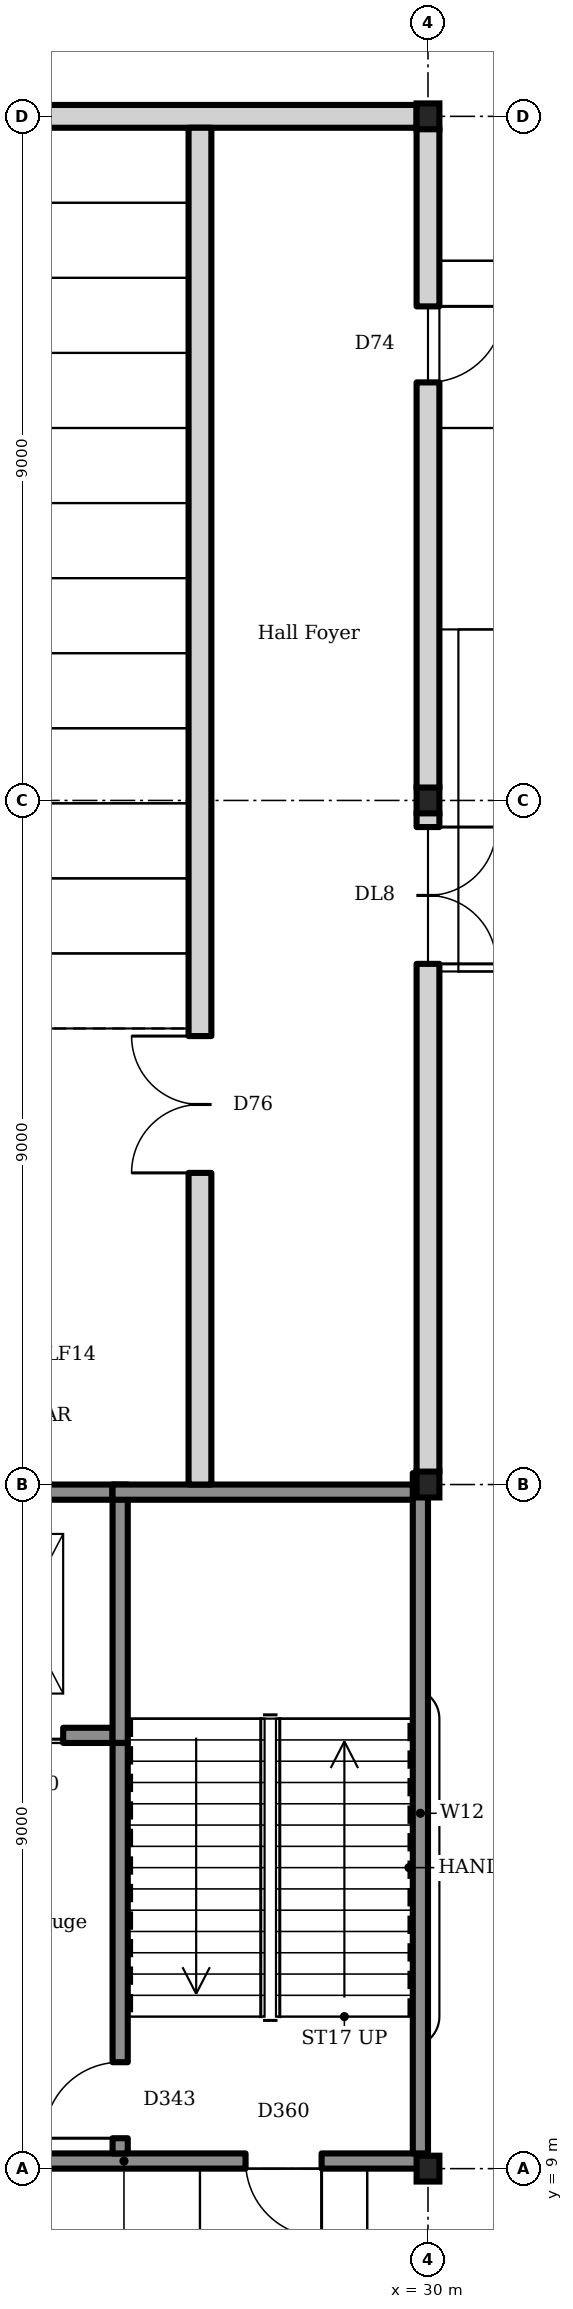
"""IFC4 building model, lengths in metres.
Left out: names, types, materials, properties, quantities, classifications, styles, units other than length and angle.
Written with IfcOpenShell. Run it as: python <this file> out.ifc"""

import sys

from ifc_helpers import new_model, si_unit, direction, frame, frame_2d, origin, origin_2d, place, context, subcontext, project, spatial, rectangle, i_section, extrude, element, fill, save


model = new_model("IFC4")
c1 = context("Model", 3, precision=1e-05, world=origin(), true_north=direction((0.0, 1.0)))
c2 = subcontext(c1, "Body", "Model", "MODEL_VIEW")
j1 = project(units=[si_unit("LENGTHUNIT", "METRE"), si_unit("PLANEANGLEUNIT", "RADIAN")], contexts=[c1])
p1 = place(None, origin())
s1 = spatial("IfcSite", under=j1, at=p1, CompositionType="ELEMENT")
p2 = place(p1, origin())
s2 = spatial("IfcBuilding", under=s1, at=p2, CompositionType="ELEMENT")
p3 = place(p2, origin())
s3 = spatial("IfcBuildingStorey", under=s2, at=p3, CompositionType="ELEMENT", Elevation=0.0)
p4 = place(p3, frame((23.25, 17.9, -1.1), z_axis=(0.0, 0.0, 1.0), x_axis=(1.0, 0.0, 0.0)))
e1 = element("IfcWall", 1, at=p4, inside=s3, PredefinedType="SOLIDWALL", context=c2, shape_type="SweptSolid", body=[
    extrude(rectangle(XDim=2.6, YDim=0.2, at=frame_2d((1.3, 0.0))), origin(), (0.0, 0.0, 1.0), 6.5),
])
p5 = place(p3, frame((23.45, 14.7, -1.1), z_axis=(0.0, 0.0, 1.0), x_axis=(1.0, 0.0, 0.0)))
e2 = element("IfcWall", 2, at=p5, inside=s3, PredefinedType="SOLIDWALL", context=c2, shape_type="SweptSolid", body=[
    extrude(rectangle(XDim=2.4, YDim=0.2, at=frame_2d((1.2, 0.0))), origin(), (0.0, 0.0, 1.0), 6.5),
])
p6 = place(p5, frame((0.65, 0.0, 1.1)))
e3 = element("IfcOpeningElement", 3, at=p6, cuts=e2, PredefinedType="OPENING", context=c2, shape_type="SweptSolid", body=[
    extrude(rectangle(XDim=1.1, YDim=2.1, at=frame_2d((0.55, 1.05))), frame((0.0, 0.11, 0.0), z_axis=(0.0, -1.0, 0.0), x_axis=(1.0, 0.0, 0.0)), (0.0, 0.0, 1.0), 0.22),
])
p7 = place(p3, frame((25.95, 14.6, -1.1), z_axis=(0.0, 0.0, 1.0), x_axis=(0.0, 1.0, 0.0)))
e4 = element("IfcWall", 4, at=p7, inside=s3, PredefinedType="SOLIDWALL", context=c2, shape_type="SweptSolid", body=[
    extrude(rectangle(XDim=3.4, YDim=0.2, at=frame_2d((1.7, 0.0))), origin(), (0.0, 0.0, 1.0), 6.5),
])
for number, where, z_axis, x_axis in (
    (5, (30.0, 9.0, 0.0), (0.0, 0.0, 1.0), (1.0, 0.0, 0.0)),
    (6, (30.0, 18.0, 0.0), (0.0, 0.0, 1.0), (1.0, 0.0, 0.0)),
    (7, (30.0, 27.0, 0.0), (0.0, 0.0, 1.0), (1.0, 0.0, 0.0)),
    (8, (30.0, 36.0, 0.0), (0.0, 0.0, 1.0), (1.0, 0.0, 0.0)),
):
    element("IfcColumn", number, at=place(p3, frame(where, z_axis=z_axis, x_axis=x_axis)), inside=s3, PredefinedType="COLUMN", context=c2, shape_type="SweptSolid", body=[
        extrude(i_section(OverallWidth=0.3, OverallDepth=0.34, WebThickness=0.012, FlangeThickness=0.021, FilletRadius=0.027, at=origin_2d()), origin(), (0.0, 0.0, 1.0), 5.4),
    ])
p8 = place(p3, frame((22.15, 36.0, 0.0), z_axis=(0.0, 0.0, 1.0), x_axis=(1.0, 0.0, 0.0)))
e9 = element("IfcWall", 9, at=p8, inside=s3, PredefinedType="SOLIDWALL", context=c2, shape_type="SweptSolid", body=[
    extrude(rectangle(XDim=7.7, YDim=0.3, at=frame_2d((3.85, 0.0))), origin(), (0.0, 0.0, 1.0), 5.2),
])
p9 = place(p3, frame((30.0, 18.15, 0.0), z_axis=(0.0, 0.0, 1.0), x_axis=(0.0, 1.0, 0.0)))
e10 = element("IfcWall", 10, at=p9, inside=s3, PredefinedType="SOLIDWALL", context=c2, shape_type="SweptSolid", body=[
    extrude(rectangle(XDim=8.7, YDim=0.3, at=frame_2d((4.35, 0.0))), origin(), (0.0, 0.0, 1.0), 5.2),
])
p10 = place(p9, frame((6.7, 0.0, 0.0)))
e11 = element("IfcOpeningElement", 11, at=p10, cuts=e10, PredefinedType="OPENING", context=c2, shape_type="SweptSolid", body=[
    extrude(rectangle(XDim=1.8, YDim=2.4, at=frame_2d((0.9, 1.2))), frame((0.0, 0.16, 0.0), z_axis=(0.0, -1.0, 0.0), x_axis=(1.0, 0.0, 0.0)), (0.0, 0.0, 1.0), 0.32),
])
p11 = place(p3, frame((30.0, 27.15, 0.0), z_axis=(0.0, 0.0, 1.0), x_axis=(0.0, 1.0, 0.0)))
e12 = element("IfcWall", 12, at=p11, inside=s3, PredefinedType="SOLIDWALL", context=c2, shape_type="SweptSolid", body=[
    extrude(rectangle(XDim=8.7, YDim=0.3, at=frame_2d((4.35, 0.0))), origin(), (0.0, 0.0, 1.0), 5.2),
])
p12 = place(p11, frame((5.35, 0.0, 0.0)))
e13 = element("IfcOpeningElement", 13, at=p12, cuts=e12, PredefinedType="OPENING", context=c2, shape_type="SweptSolid", body=[
    extrude(rectangle(XDim=1.0, YDim=2.1, at=frame_2d((0.5, 1.05))), frame((0.0, 0.16, 0.0), z_axis=(0.0, -1.0, 0.0), x_axis=(1.0, 0.0, 0.0)), (0.0, 0.0, 1.0), 0.32),
])
p13 = place(p3, frame((27.0, 18.0, 0.0), z_axis=(0.0, 0.0, 1.0), x_axis=(0.0, 1.0, 0.0)))
e14 = element("IfcWall", 14, at=p13, inside=s3, PredefinedType="SOLIDWALL", context=c2, shape_type="SweptSolid", body=[
    extrude(rectangle(XDim=17.85, YDim=0.3, at=frame_2d((8.925, 0.0))), origin(), (0.0, 0.0, 1.0), 5.2),
])
p14 = place(p13, frame((4.1, 0.0, 0.0)))
e15 = element("IfcOpeningElement", 15, at=p14, cuts=e14, PredefinedType="OPENING", context=c2, shape_type="SweptSolid", body=[
    extrude(rectangle(XDim=1.8, YDim=2.1, at=frame_2d((0.9, 1.05))), frame((0.0, 0.16, 0.0), z_axis=(0.0, -1.0, 0.0), x_axis=(1.0, 0.0, 0.0)), (0.0, 0.0, 1.0), 0.32),
])
p15 = place(p3, frame((22.2, 9.1, 0.0), z_axis=(0.0, 0.0, 1.0), x_axis=(1.0, 0.0, 0.0)))
e16 = element("IfcWall", 16, at=p15, inside=s3, PredefinedType="SOLIDWALL", context=c2, shape_type="SweptSolid", body=[
    extrude(rectangle(XDim=7.79, YDim=0.2, at=frame_2d((3.895, 0.0))), origin(), (0.0, 0.0, 1.0), 5.2),
])
p16 = place(p15, frame((1.2, 0.0, 0.0)))
e17 = element("IfcOpeningElement", 17, at=p16, cuts=e16, PredefinedType="OPENING", context=c2, shape_type="SweptSolid", body=[
    extrude(rectangle(XDim=1.0, YDim=2.1, at=frame_2d((0.5, 1.05))), frame((0.0, 0.11, 0.0), z_axis=(0.0, -1.0, 0.0), x_axis=(1.0, 0.0, 0.0)), (0.0, 0.0, 1.0), 0.22),
])
p17 = place(p15, frame((5.4, 0.0, 0.0)))
e18 = element("IfcOpeningElement", 18, at=p17, cuts=e16, PredefinedType="OPENING", context=c2, shape_type="SweptSolid", body=[
    extrude(rectangle(XDim=1.0, YDim=2.1, at=frame_2d((0.5, 1.05))), frame((0.0, 0.11, 0.0), z_axis=(0.0, -1.0, 0.0), x_axis=(1.0, 0.0, 0.0)), (0.0, 0.0, 1.0), 0.22),
])
p18 = place(p3, frame((29.9, 9.2, 0.0), z_axis=(0.0, 0.0, 1.0), x_axis=(0.0, 1.0, 0.0)))
e19 = element("IfcWall", 19, at=p18, inside=s3, PredefinedType="SOLIDWALL", context=c2, shape_type="SweptSolid", body=[
    extrude(rectangle(XDim=8.95, YDim=0.2, at=frame_2d((4.475, 0.0))), origin(), (0.0, 0.0, 1.0), 5.2),
])
p19 = place(p3, frame((25.85, 17.9, 0.0), z_axis=(0.0, 0.0, 1.0), x_axis=(1.0, 0.0, 0.0)))
e20 = element("IfcWall", 20, at=p19, inside=s3, PredefinedType="SOLIDWALL", context=c2, shape_type="SweptSolid", body=[
    extrude(rectangle(XDim=3.95, YDim=0.2, at=frame_2d((1.975, 0.0))), origin(), (0.0, 0.0, 1.0), 5.2),
])
p20 = place(p3, frame((25.95, 9.2, 0.0), z_axis=(0.0, 0.0, 1.0), x_axis=(0.0, 1.0, 0.0)))
e21 = element("IfcWall", 21, at=p20, inside=s3, PredefinedType="SOLIDWALL", context=c2, shape_type="SweptSolid", body=[
    extrude(rectangle(XDim=5.4, YDim=0.2, at=frame_2d((2.7, 0.0))), origin(), (0.0, 0.0, 1.0), 5.2),
])
p21 = place(p20, frame((0.2, 0.0, 0.0)))
e22 = element("IfcOpeningElement", 22, at=p21, cuts=e21, PredefinedType="OPENING", context=c2, shape_type="SweptSolid", body=[
    extrude(rectangle(XDim=1.0, YDim=2.1, at=frame_2d((0.5, 1.05))), frame((0.0, 0.11, 0.0), z_axis=(0.0, -1.0, 0.0), x_axis=(1.0, 0.0, 0.0)), (0.0, 0.0, 1.0), 0.22),
])
p22 = place(p6, origin())
e23 = element("IfcDoor", 23, at=p22, inside=s3, OperationType="SLIDING_TO_LEFT", PredefinedType="DOOR", context=c2, shape_type="SweptSolid", body=[
    extrude(rectangle(XDim=1.1, YDim=2.1, at=frame_2d((0.55, 1.05))), frame((0.0, 0.025, 0.0), z_axis=(0.0, -1.0, 0.0), x_axis=(1.0, 0.0, 0.0)), (0.0, 0.0, 1.0), 0.05),
])
fill(e3, e23)
p23 = place(p10, frame((1.8, 0.0, 0.0), z_axis=(0.0, 0.0, 1.0), x_axis=(-1.0, 0.0, 0.0)))
e24 = element("IfcDoor", 24, at=p23, inside=s3, OperationType="DOUBLE_DOOR_SINGLE_SWING", PredefinedType="DOOR", context=c2, shape_type="SweptSolid", body=[
    extrude(rectangle(XDim=1.8, YDim=2.4, at=frame_2d((0.9, 1.2))), frame((0.0, 0.025, 0.0), z_axis=(0.0, -1.0, 0.0), x_axis=(1.0, 0.0, 0.0)), (0.0, 0.0, 1.0), 0.05),
])
fill(e11, e24)
p24 = place(p12, frame((1.0, 0.0, 0.0), z_axis=(0.0, 0.0, 1.0), x_axis=(-1.0, 0.0, 0.0)))
e25 = element("IfcDoor", 25, at=p24, inside=s3, OperationType="SINGLE_SWING_RIGHT", PredefinedType="DOOR", context=c2, shape_type="SweptSolid", body=[
    extrude(rectangle(XDim=1.0, YDim=2.1, at=frame_2d((0.5, 1.05))), frame((0.0, 0.025, 0.0), z_axis=(0.0, -1.0, 0.0), x_axis=(1.0, 0.0, 0.0)), (0.0, 0.0, 1.0), 0.05),
])
fill(e13, e25)
p25 = place(p14, origin())
e26 = element("IfcDoor", 26, at=p25, inside=s3, OperationType="DOUBLE_DOOR_SINGLE_SWING", PredefinedType="DOOR", context=c2, shape_type="SweptSolid", body=[
    extrude(rectangle(XDim=1.8, YDim=2.1, at=frame_2d((0.9, 1.05))), frame((0.0, 0.025, 0.0), z_axis=(0.0, -1.0, 0.0), x_axis=(1.0, 0.0, 0.0)), (0.0, 0.0, 1.0), 0.05),
])
fill(e15, e26)
p26 = place(p21, origin())
e27 = element("IfcDoor", 27, at=p26, inside=s3, OperationType="SINGLE_SWING_RIGHT", PredefinedType="DOOR", context=c2, shape_type="SweptSolid", body=[
    extrude(rectangle(XDim=1.0, YDim=2.1, at=frame_2d((0.5, 1.05))), frame((0.0, 0.025, 0.0), z_axis=(0.0, -1.0, 0.0), x_axis=(1.0, 0.0, 0.0)), (0.0, 0.0, 1.0), 0.05),
])
fill(e22, e27)
p27 = place(p17, frame((1.0, 0.0, 0.0), z_axis=(0.0, 0.0, 1.0), x_axis=(-1.0, 0.0, 0.0)))
e28 = element("IfcDoor", 28, at=p27, inside=s3, OperationType="SINGLE_SWING_RIGHT", PredefinedType="DOOR", context=c2, shape_type="SweptSolid", body=[
    extrude(rectangle(XDim=1.0, YDim=2.1, at=frame_2d((0.5, 1.05))), frame((0.0, 0.025, 0.0), z_axis=(0.0, -1.0, 0.0), x_axis=(1.0, 0.0, 0.0)), (0.0, 0.0, 1.0), 0.05),
])
fill(e18, e28)
save(model, sys.argv[1])
